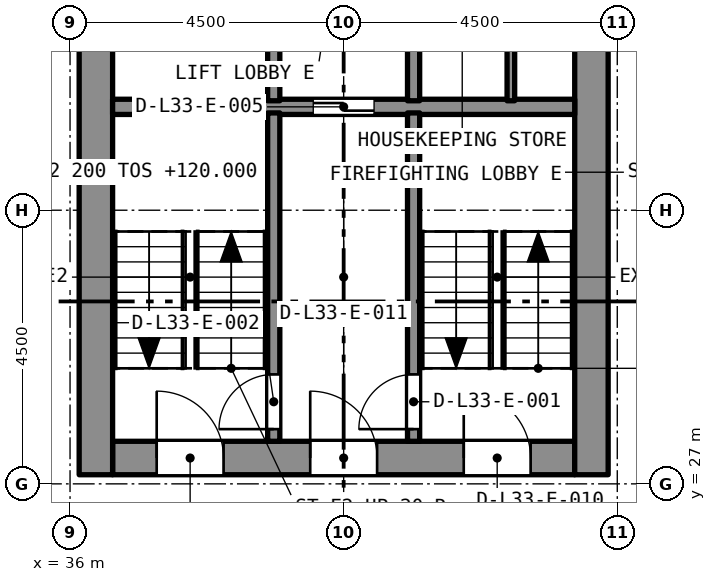
"""IFC4 building model, lengths in metres.
Left out: names, types, materials, properties, quantities, classifications, styles, units other than length and angle.
Written with IfcOpenShell. Run it as: python <this file> out.ifc"""

import sys

from ifc_helpers import new_model, si_unit, direction, frame, frame_2d, origin, place, context, subcontext, project, spatial, rectangle, extrude, element, fill, save


model = new_model("IFC4")
c1 = context("Model", 3, precision=1e-05, world=origin(), true_north=direction((0.0, 1.0)))
c2 = subcontext(c1, "Body", "Model", "MODEL_VIEW")
j1 = project(units=[si_unit("LENGTHUNIT", "METRE"), si_unit("PLANEANGLEUNIT", "RADIAN")], contexts=[c1])
p1 = place(None, origin())
s1 = spatial("IfcSite", under=j1, at=p1, CompositionType="ELEMENT")
p2 = place(p1, origin())
s2 = spatial("IfcBuilding", under=s1, at=p2, CompositionType="ELEMENT")
p3 = place(p2, frame((0.0, 0.0, 118.4)))
s3 = spatial("IfcBuildingStorey", under=s2, at=p3, CompositionType="ELEMENT", Elevation=118.4)
p4 = place(p3, frame((36.7, 27.425, 0.0), z_axis=(0.0, 0.0, 1.0), x_axis=(1.0, 0.0, 0.0)))
e1 = element("IfcWall", 1, at=p4, inside=s3, PredefinedType="SOLIDWALL", context=c2, shape_type="SweptSolid", body=[
    extrude(rectangle(XDim=7.6, YDim=0.55, at=frame_2d((3.8, 0.0))), origin(), (0.0, 0.0, 1.0), 3.2),
])
p5 = place(p4, frame((5.775, 0.0, 0.0)))
e2 = element("IfcOpeningElement", 2, at=p5, cuts=e1, PredefinedType="OPENING", context=c2, shape_type="SweptSolid", body=[
    extrude(rectangle(XDim=1.1, YDim=2.1, at=frame_2d((0.55, 1.05))), frame((0.0, 0.285, 0.0), z_axis=(0.0, -1.0, 0.0), x_axis=(1.0, 0.0, 0.0)), (0.0, 0.0, 1.0), 0.57),
])
p6 = place(p4, frame((3.25, 0.0, 0.0)))
e3 = element("IfcOpeningElement", 3, at=p6, cuts=e1, PredefinedType="OPENING", context=c2, shape_type="SweptSolid", body=[
    extrude(rectangle(XDim=1.1, YDim=2.1, at=frame_2d((0.55, 1.05))), frame((0.0, 0.285, 0.0), z_axis=(0.0, -1.0, 0.0), x_axis=(1.0, 0.0, 0.0)), (0.0, 0.0, 1.0), 0.57),
])
p7 = place(p4, frame((0.725, 0.0, 0.0)))
e4 = element("IfcOpeningElement", 4, at=p7, cuts=e1, PredefinedType="OPENING", context=c2, shape_type="SweptSolid", body=[
    extrude(rectangle(XDim=1.1, YDim=2.1, at=frame_2d((0.55, 1.05))), frame((0.0, 0.285, 0.0), z_axis=(0.0, -1.0, 0.0), x_axis=(1.0, 0.0, 0.0)), (0.0, 0.0, 1.0), 0.57),
])
p8 = place(p3, frame((36.425, 27.15, 0.0), z_axis=(0.0, 0.0, 1.0), x_axis=(0.0, 1.0, 0.0)))
e5 = element("IfcWall", 5, at=p8, inside=s3, PredefinedType="SOLIDWALL", context=c2, shape_type="SweptSolid", body=[
    extrude(rectangle(XDim=13.2, YDim=0.55, at=frame_2d((6.6, 0.0))), origin(), (0.0, 0.0, 1.0), 3.2),
])
p9 = place(p8, frame((8.8, 0.0, 0.0)))
e6 = element("IfcOpeningElement", 6, at=p9, cuts=e5, PredefinedType="OPENING", context=c2, shape_type="SweptSolid", body=[
    extrude(rectangle(XDim=1.2, YDim=2.1, at=frame_2d((0.6, 1.05))), frame((0.0, 0.285, 0.0), z_axis=(0.0, -1.0, 0.0), x_axis=(1.0, 0.0, 0.0)), (0.0, 0.0, 1.0), 0.57),
])
p10 = place(p3, frame((44.575, 27.15, 0.0), z_axis=(0.0, 0.0, 1.0), x_axis=(0.0, 1.0, 0.0)))
e7 = element("IfcWall", 7, at=p10, inside=s3, PredefinedType="SOLIDWALL", context=c2, shape_type="SweptSolid", body=[
    extrude(rectangle(XDim=13.2, YDim=0.55, at=frame_2d((6.6, 0.0))), origin(), (0.0, 0.0, 1.0), 3.2),
])
p11 = place(p10, frame((8.8, 0.0, 0.0)))
e8 = element("IfcOpeningElement", 8, at=p11, cuts=e7, PredefinedType="OPENING", context=c2, shape_type="SweptSolid", body=[
    extrude(rectangle(XDim=1.2, YDim=2.1, at=frame_2d((0.6, 1.05))), frame((0.0, 0.285, 0.0), z_axis=(0.0, -1.0, 0.0), x_axis=(1.0, 0.0, 0.0)), (0.0, 0.0, 1.0), 0.57),
])
p12 = place(p3, frame((36.7, 33.2, 0.0), z_axis=(0.0, 0.0, 1.0), x_axis=(1.0, 0.0, 0.0)))
e9 = element("IfcWall", 9, at=p12, inside=s3, PredefinedType="SOLIDWALL", context=c2, shape_type="SweptSolid", body=[
    extrude(rectangle(XDim=7.6, YDim=0.25, at=frame_2d((3.8, 0.0))), origin(), (0.0, 0.0, 1.0), 2.9),
])
p13 = place(p12, frame((3.3, 0.0, 0.0)))
e10 = element("IfcOpeningElement", 10, at=p13, cuts=e9, PredefinedType="OPENING", context=c2, shape_type="SweptSolid", body=[
    extrude(rectangle(XDim=1.0, YDim=2.1, at=frame_2d((0.5, 1.05))), frame((0.0, 0.135, 0.0), z_axis=(0.0, -1.0, 0.0), x_axis=(1.0, 0.0, 0.0)), (0.0, 0.0, 1.0), 0.27),
])
p14 = place(p3, frame((41.65, 27.7, 0.0), z_axis=(0.0, 0.0, 1.0), x_axis=(0.0, 1.0, 0.0)))
e11 = element("IfcWall", 11, at=p14, inside=s3, PredefinedType="SOLIDWALL", context=c2, shape_type="SweptSolid", body=[
    extrude(rectangle(XDim=5.4, YDim=0.2, at=frame_2d((2.7, 0.0))), origin(), (0.0, 0.0, 1.0), 2.9),
])
p15 = place(p14, frame((0.2, 0.0, 0.0)))
e12 = element("IfcOpeningElement", 12, at=p15, cuts=e11, PredefinedType="OPENING", context=c2, shape_type="SweptSolid", body=[
    extrude(rectangle(XDim=0.9, YDim=2.1, at=frame_2d((0.45, 1.05))), frame((0.0, 0.11, 0.0), z_axis=(0.0, -1.0, 0.0), x_axis=(1.0, 0.0, 0.0)), (0.0, 0.0, 1.0), 0.22),
])
p16 = place(p3, frame((39.35, 27.7, 0.0), z_axis=(0.0, 0.0, 1.0), x_axis=(0.0, 1.0, 0.0)))
e13 = element("IfcWall", 13, at=p16, inside=s3, PredefinedType="SOLIDWALL", context=c2, shape_type="SweptSolid", body=[
    extrude(rectangle(XDim=5.4, YDim=0.2, at=frame_2d((2.7, 0.0))), origin(), (0.0, 0.0, 1.0), 2.9),
])
p17 = place(p16, frame((0.2, 0.0, 0.0)))
e14 = element("IfcOpeningElement", 14, at=p17, cuts=e13, PredefinedType="OPENING", context=c2, shape_type="SweptSolid", body=[
    extrude(rectangle(XDim=0.9, YDim=2.1, at=frame_2d((0.45, 1.05))), frame((0.0, 0.11, 0.0), z_axis=(0.0, -1.0, 0.0), x_axis=(1.0, 0.0, 0.0)), (0.0, 0.0, 1.0), 0.22),
])
for number, where, z_axis, x_axis in (
    (15, (41.65, 33.3, 0.0), (0.0, 0.0, 1.0), (0.0, 1.0, 0.0)),
    (16, (39.35, 33.3, 0.0), (0.0, 0.0, 1.0), (0.0, 1.0, 0.0)),
):
    element("IfcWall", number, at=place(p3, frame(where, z_axis=z_axis, x_axis=x_axis)), inside=s3, PredefinedType="SOLIDWALL", context=c2, shape_type="SweptSolid", body=[
        extrude(rectangle(XDim=2.3, YDim=0.2, at=frame_2d((1.15, 0.0))), origin(), (0.0, 0.0, 1.0), 2.9),
    ])
p18 = place(p3, frame((43.25, 33.3, 0.0), z_axis=(0.0, 0.0, 1.0), x_axis=(0.0, 1.0, 0.0)))
e17 = element("IfcWall", 17, at=p18, inside=s3, PredefinedType="PARTITIONING", context=c2, shape_type="SweptSolid", body=[
    extrude(rectangle(XDim=2.3, YDim=0.125, at=frame_2d((1.15, 0.0))), origin(), (0.0, 0.0, 1.0), 2.9),
])
p19 = place(p15, origin())
e18 = element("IfcDoor", 18, at=p19, inside=s3, OperationType="SINGLE_SWING_LEFT", PredefinedType="DOOR", context=c2, shape_type="SweptSolid", body=[
    extrude(rectangle(XDim=0.9, YDim=2.1, at=frame_2d((0.45, 1.05))), frame((0.0, 0.025, 0.0), z_axis=(0.0, -1.0, 0.0), x_axis=(1.0, 0.0, 0.0)), (0.0, 0.0, 1.0), 0.05),
])
fill(e12, e18)
p20 = place(p17, origin())
e19 = element("IfcDoor", 19, at=p20, inside=s3, OperationType="SINGLE_SWING_LEFT", PredefinedType="DOOR", context=c2, shape_type="SweptSolid", body=[
    extrude(rectangle(XDim=0.9, YDim=2.1, at=frame_2d((0.45, 1.05))), frame((0.0, 0.025, 0.0), z_axis=(0.0, -1.0, 0.0), x_axis=(1.0, 0.0, 0.0)), (0.0, 0.0, 1.0), 0.05),
])
fill(e14, e19)
p21 = place(p13, origin())
e20 = element("IfcDoor", 20, at=p21, inside=s3, OperationType="SLIDING_TO_LEFT", PredefinedType="DOOR", context=c2, shape_type="SweptSolid", body=[
    extrude(rectangle(XDim=1.0, YDim=2.1, at=frame_2d((0.5, 1.05))), frame((0.0, 0.025, 0.0), z_axis=(0.0, -1.0, 0.0), x_axis=(1.0, 0.0, 0.0)), (0.0, 0.0, 1.0), 0.05),
])
fill(e10, e20)
p22 = place(p5, origin())
e21 = element("IfcDoor", 21, at=p22, inside=s3, OperationType="SINGLE_SWING_LEFT", PredefinedType="DOOR", context=c2, shape_type="SweptSolid", body=[
    extrude(rectangle(XDim=1.1, YDim=2.1, at=frame_2d((0.55, 1.05))), frame((0.0, 0.025, 0.0), z_axis=(0.0, -1.0, 0.0), x_axis=(1.0, 0.0, 0.0)), (0.0, 0.0, 1.0), 0.05),
])
fill(e2, e21)
p23 = place(p6, origin())
e22 = element("IfcDoor", 22, at=p23, inside=s3, OperationType="SINGLE_SWING_LEFT", PredefinedType="DOOR", context=c2, shape_type="SweptSolid", body=[
    extrude(rectangle(XDim=1.1, YDim=2.1, at=frame_2d((0.55, 1.05))), frame((0.0, 0.025, 0.0), z_axis=(0.0, -1.0, 0.0), x_axis=(1.0, 0.0, 0.0)), (0.0, 0.0, 1.0), 0.05),
])
fill(e3, e22)
p24 = place(p7, origin())
e23 = element("IfcDoor", 23, at=p24, inside=s3, OperationType="SINGLE_SWING_LEFT", PredefinedType="DOOR", context=c2, shape_type="SweptSolid", body=[
    extrude(rectangle(XDim=1.1, YDim=2.1, at=frame_2d((0.55, 1.05))), frame((0.0, 0.025, 0.0), z_axis=(0.0, -1.0, 0.0), x_axis=(1.0, 0.0, 0.0)), (0.0, 0.0, 1.0), 0.05),
])
fill(e4, e23)
save(model, sys.argv[1])
